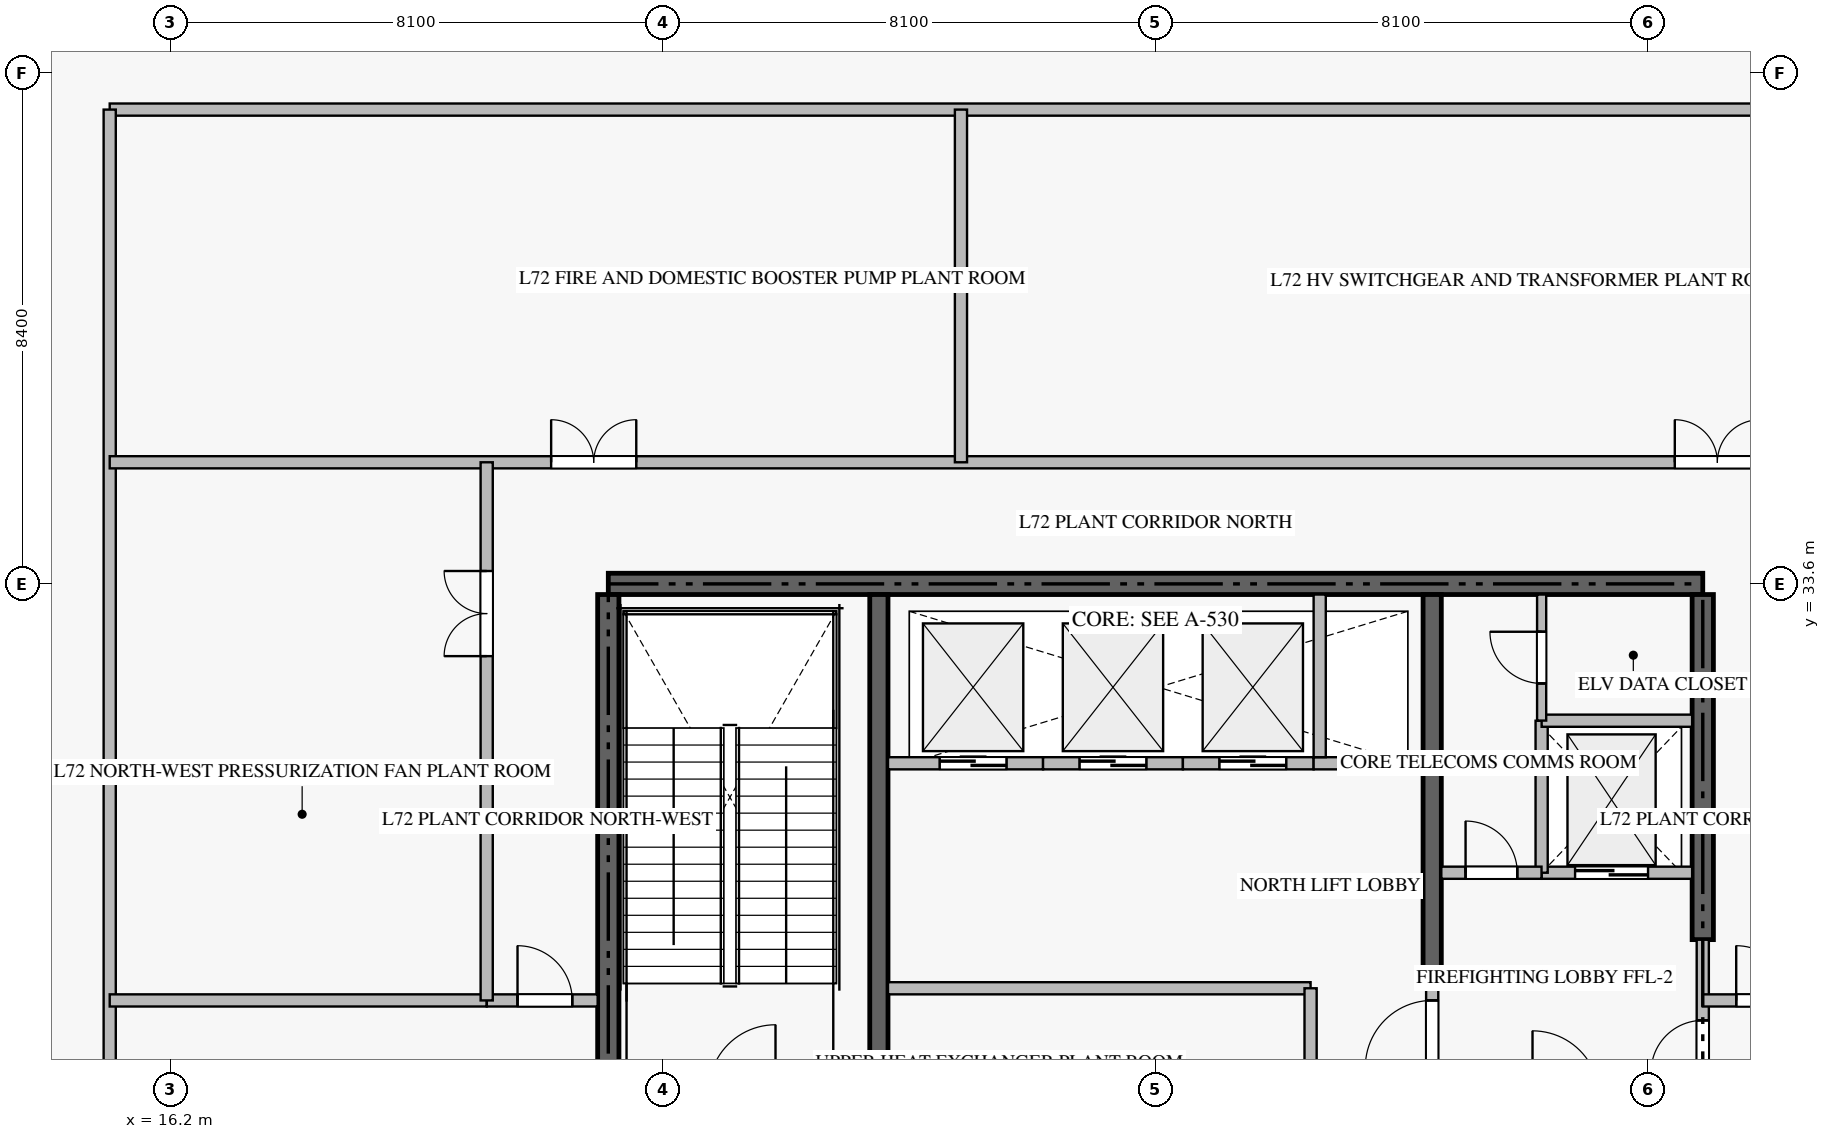
"""IFC4 building model, lengths in metres.
Left out: names, types, materials, properties, quantities, classifications, styles, units other than length and angle.
Written with IfcOpenShell. Run it as: python <this file> out.ifc"""

import sys

from ifc_helpers import new_model, si_unit, direction, frame, frame_2d, origin, place, context, subcontext, project, spatial, rectangle, extrude, source, transform, mapped, element, fill, save


model = new_model("IFC4")
c1 = context("Model", 3, precision=1e-05, world=origin(), true_north=direction((0.0, 1.0)))
c2 = subcontext(c1, "Body", "Model", "MODEL_VIEW")
j1 = project(units=[si_unit("LENGTHUNIT", "METRE"), si_unit("PLANEANGLEUNIT", "RADIAN")], contexts=[c1])
p1 = place(None, origin())
s1 = spatial("IfcSite", under=j1, at=p1, CompositionType="ELEMENT")
p2 = place(p1, origin())
s2 = spatial("IfcBuilding", under=s1, at=p2, CompositionType="ELEMENT")
p3 = place(p2, frame((0.0, 0.0, 287.45)))
s3 = spatial("IfcBuildingStorey", under=s2, at=p3, CompositionType="ELEMENT", Elevation=287.45)
p4 = place(p3, frame((41.4, 33.6, -0.44), z_axis=(0.0, 0.0, 1.0), x_axis=(-1.0, 0.0, 0.0)))
e1 = element("IfcWall", 1, at=p4, inside=s3, PredefinedType="SHEAR", context=c2, shape_type="SweptSolid", body=[
    extrude(rectangle(XDim=18.0, YDim=0.35, at=frame_2d((9.0, 0.0))), origin(), (0.0, 0.0, 1.0), 6.178),
])
p5 = place(p3, frame((23.4, 24.25, -0.44), z_axis=(0.0, 0.0, 1.0), x_axis=(0.0, 1.0, 0.0)))
e2 = element("IfcWall", 2, at=p5, inside=s3, PredefinedType="SHEAR", context=c2, shape_type="SweptSolid", body=[
    extrude(rectangle(XDim=9.175, YDim=0.35, at=frame_2d((4.587, 0.0))), origin(), (0.0, 0.0, 1.0), 6.178),
])
p6 = place(p3, frame((41.4, 27.75, -0.44), z_axis=(0.0, 0.0, 1.0), x_axis=(0.0, 1.0, 0.0)))
e3 = element("IfcWall", 3, at=p6, inside=s3, PredefinedType="SHEAR", context=c2, shape_type="SweptSolid", body=[
    extrude(rectangle(XDim=5.675, YDim=0.35, at=frame_2d((2.837, 0.0))), origin(), (0.0, 0.0, 1.0), 6.178),
])
p7 = place(p3, frame((27.85, 23.55, -0.44), z_axis=(0.0, 0.0, 1.0), x_axis=(0.0, 1.0, 0.0)))
e4 = element("IfcWall", 4, at=p7, inside=s3, PredefinedType="SHEAR", context=c2, shape_type="SweptSolid", body=[
    extrude(rectangle(XDim=9.875, YDim=0.3, at=frame_2d((4.938, 0.0))), origin(), (0.0, 0.0, 1.0), 6.178),
])
p8 = place(p3, frame((36.95, 27.05, -0.44), z_axis=(0.0, 0.0, 1.0), x_axis=(0.0, 1.0, 0.0)))
e5 = element("IfcWall", 5, at=p8, inside=s3, PredefinedType="SHEAR", context=c2, shape_type="SweptSolid", body=[
    extrude(rectangle(XDim=6.375, YDim=0.3, at=frame_2d((3.188, 0.0))), origin(), (0.0, 0.0, 1.0), 6.178),
])
p9 = place(p3, frame((38.75, 28.85, 0.0), z_axis=(0.0, 0.0, 1.0), x_axis=(1.0, 0.0, 0.0)))
e6 = element("IfcWall", 6, at=p9, inside=s3, PredefinedType="STANDARD", context=c2, shape_type="SweptSolid", body=[
    extrude(rectangle(XDim=2.475, YDim=0.2, at=frame_2d((1.238, 0.0))), origin(), (0.0, 0.0, 1.0), 5.74),
])
p10 = place(p9, frame((0.55, 0.0, 0.0)))
e7 = element("IfcOpeningElement", 7, at=p10, cuts=e6, PredefinedType="OPENING", context=c2, shape_type="SweptSolid", body=[
    extrude(rectangle(XDim=1.2, YDim=2.2, at=frame_2d((0.6, 1.1))), frame((0.0, 0.11, 0.0), z_axis=(0.0, -1.0, 0.0), x_axis=(1.0, 0.0, 0.0)), (0.0, 0.0, 1.0), 0.22),
])
p11 = place(p3, frame((28.0, 30.65, 0.0), z_axis=(0.0, 0.0, 1.0), x_axis=(1.0, 0.0, 0.0)))
e8 = element("IfcWall", 8, at=p11, inside=s3, PredefinedType="STANDARD", context=c2, shape_type="SweptSolid", body=[
    extrude(rectangle(XDim=2.55, YDim=0.2, at=frame_2d((1.275, 0.0))), origin(), (0.0, 0.0, 1.0), 5.74),
])
p12 = place(p11, frame((0.85, 0.0, 0.0)))
e9 = element("IfcOpeningElement", 9, at=p12, cuts=e8, PredefinedType="OPENING", context=c2, shape_type="SweptSolid", body=[
    extrude(rectangle(XDim=1.1, YDim=2.2, at=frame_2d((0.55, 1.1))), frame((0.0, 0.11, 0.0), z_axis=(0.0, -1.0, 0.0), x_axis=(1.0, 0.0, 0.0)), (0.0, 0.0, 1.0), 0.22),
])
p13 = place(p3, frame((30.55, 30.65, 0.0), z_axis=(0.0, 0.0, 1.0), x_axis=(1.0, 0.0, 0.0)))
e10 = element("IfcWall", 10, at=p13, inside=s3, PredefinedType="STANDARD", context=c2, shape_type="SweptSolid", body=[
    extrude(rectangle(XDim=2.3, YDim=0.2, at=frame_2d((1.15, 0.0))), origin(), (0.0, 0.0, 1.0), 5.74),
])
p14 = place(p13, frame((0.6, 0.0, 0.0)))
e11 = element("IfcOpeningElement", 11, at=p14, cuts=e10, PredefinedType="OPENING", context=c2, shape_type="SweptSolid", body=[
    extrude(rectangle(XDim=1.1, YDim=2.2, at=frame_2d((0.55, 1.1))), frame((0.0, 0.11, 0.0), z_axis=(0.0, -1.0, 0.0), x_axis=(1.0, 0.0, 0.0)), (0.0, 0.0, 1.0), 0.22),
])
p15 = place(p3, frame((32.85, 30.65, 0.0), z_axis=(0.0, 0.0, 1.0), x_axis=(1.0, 0.0, 0.0)))
e12 = element("IfcWall", 12, at=p15, inside=s3, PredefinedType="STANDARD", context=c2, shape_type="SweptSolid", body=[
    extrude(rectangle(XDim=2.15, YDim=0.2, at=frame_2d((1.075, 0.0))), origin(), (0.0, 0.0, 1.0), 5.74),
])
p16 = place(p15, frame((0.6, 0.0, 0.0)))
e13 = element("IfcOpeningElement", 13, at=p16, cuts=e12, PredefinedType="OPENING", context=c2, shape_type="SweptSolid", body=[
    extrude(rectangle(XDim=1.1, YDim=2.2, at=frame_2d((0.55, 1.1))), frame((0.0, 0.11, 0.0), z_axis=(0.0, -1.0, 0.0), x_axis=(1.0, 0.0, 0.0)), (0.0, 0.0, 1.0), 0.22),
])
p17 = place(p3, frame((35.0, 30.65, 0.0), z_axis=(0.0, 0.0, 1.0), x_axis=(1.0, 0.0, 0.0)))
e14 = element("IfcWall", 14, at=p17, inside=s3, PredefinedType="STANDARD", context=c2, shape_type="SweptSolid", body=[
    extrude(rectangle(XDim=1.8, YDim=0.2, at=frame_2d((0.9, 0.0))), origin(), (0.0, 0.0, 1.0), 5.74),
])
p18 = place(p3, frame((35.1, 30.75, 0.0), z_axis=(0.0, 0.0, 1.0), x_axis=(0.0, 1.0, 0.0)))
e15 = element("IfcWall", 15, at=p18, inside=s3, PredefinedType="STANDARD", context=c2, shape_type="SweptSolid", body=[
    extrude(rectangle(XDim=2.675, YDim=0.2, at=frame_2d((1.337, 0.0))), origin(), (0.0, 0.0, 1.0), 5.74),
])
p19 = place(p3, frame((38.75, 28.85, 0.0), z_axis=(0.0, 0.0, 1.0), x_axis=(0.0, 1.0, 0.0)))
e16 = element("IfcWall", 16, at=p19, inside=s3, PredefinedType="STANDARD", context=c2, shape_type="SweptSolid", body=[
    extrude(rectangle(XDim=2.5, YDim=0.2, at=frame_2d((1.25, 0.0))), origin(), (0.0, 0.0, 1.0), 5.74),
])
p20 = place(p3, frame((38.75, 31.35, 0.0), z_axis=(0.0, 0.0, 1.0), x_axis=(1.0, 0.0, 0.0)))
e17 = element("IfcWall", 17, at=p20, inside=s3, PredefinedType="STANDARD", context=c2, shape_type="SweptSolid", body=[
    extrude(rectangle(XDim=2.475, YDim=0.2, at=frame_2d((1.238, 0.0))), origin(), (0.0, 0.0, 1.0), 5.74),
])
p21 = place(p3, frame((37.1, 28.85, 0.0), z_axis=(0.0, 0.0, 1.0), x_axis=(1.0, 0.0, 0.0)))
e18 = element("IfcWall", 18, at=p21, inside=s3, PredefinedType="STANDARD", context=c2, shape_type="SweptSolid", body=[
    extrude(rectangle(XDim=1.648, YDim=0.2, at=frame_2d((0.824, 0.0))), origin(), (0.0, 0.0, 1.0), 5.74),
])
p22 = place(p21, frame((0.399, 0.0, 0.0)))
e19 = element("IfcOpeningElement", 19, at=p22, cuts=e18, PredefinedType="OPENING", context=c2, shape_type="SweptSolid", body=[
    extrude(rectangle(XDim=0.85, YDim=2.1, at=frame_2d((0.425, 1.05))), frame((0.0, 0.11, 0.0), z_axis=(0.0, -1.0, 0.0), x_axis=(1.0, 0.0, 0.0)), (0.0, 0.0, 1.0), 0.22),
])
p23 = place(p3, frame((41.4, 25.352, 0.0), z_axis=(0.0, 0.0, 1.0), x_axis=(0.0, 1.0, 0.0)))
e20 = element("IfcWall", 20, at=p23, inside=s3, PredefinedType="STANDARD", context=c2, shape_type="SweptSolid", body=[
    extrude(rectangle(XDim=2.396, YDim=0.2, at=frame_2d((1.198, 0.0))), origin(), (0.0, 0.0, 1.0), 5.74),
])
p24 = place(p23, frame((0.22, 0.0, 0.0)))
e21 = element("IfcOpeningElement", 21, at=p24, cuts=e20, PredefinedType="OPENING", context=c2, shape_type="SweptSolid", body=[
    extrude(rectangle(XDim=0.85, YDim=2.1, at=frame_2d((0.425, 1.05))), frame((0.0, 0.11, 0.0), z_axis=(0.0, -1.0, 0.0), x_axis=(1.0, 0.0, 0.0)), (0.0, 0.0, 1.0), 0.22),
])
p25 = place(p3, frame((36.95, 25.352, 0.0), z_axis=(0.0, 0.0, 1.0), x_axis=(0.0, 1.0, 0.0)))
e22 = element("IfcWall", 22, at=p25, inside=s3, PredefinedType="STANDARD", context=c2, shape_type="SweptSolid", body=[
    extrude(rectangle(XDim=1.696, YDim=0.2, at=frame_2d((0.848, 0.0))), origin(), (0.0, 0.0, 1.0), 5.74),
])
p26 = place(p25, frame((0.298, 0.0, 0.0)))
e23 = element("IfcOpeningElement", 23, at=p26, cuts=e22, PredefinedType="OPENING", context=c2, shape_type="SweptSolid", body=[
    extrude(rectangle(XDim=1.1, YDim=2.15, at=frame_2d((0.55, 1.075))), frame((0.0, 0.11, 0.0), z_axis=(0.0, -1.0, 0.0), x_axis=(1.0, 0.0, 0.0)), (0.0, 0.0, 1.0), 0.22),
])
p27 = place(p3, frame((38.75, 31.352, 0.0), z_axis=(0.0, 0.0, 1.0), x_axis=(0.0, 1.0, 0.0)))
e24 = element("IfcWall", 24, at=p27, inside=s3, PredefinedType="PARTITIONING", context=c2, shape_type="SweptSolid", body=[
    extrude(rectangle(XDim=2.073, YDim=0.15, at=frame_2d((1.037, 0.0))), origin(), (0.0, 0.0, 1.0), 5.74),
])
p28 = place(p27, frame((0.611, 0.0, 0.0)))
e25 = element("IfcOpeningElement", 25, at=p28, cuts=e24, PredefinedType="OPENING", context=c2, shape_type="SweptSolid", body=[
    extrude(rectangle(XDim=0.85, YDim=2.1, at=frame_2d((0.425, 1.05))), frame((0.0, 0.085, 0.0), z_axis=(0.0, -1.0, 0.0), x_axis=(1.0, 0.0, 0.0)), (0.0, 0.0, 1.0), 0.17),
])
p29 = place(p3, frame((28.0, 26.95, 0.0), z_axis=(0.0, 0.0, 1.0), x_axis=(1.0, 0.0, 0.0)))
e26 = element("IfcWall", 26, at=p29, inside=s3, PredefinedType="STANDARD", context=c2, shape_type="SweptSolid", body=[
    extrude(rectangle(XDim=6.95, YDim=0.2, at=frame_2d((3.475, 0.0))), origin(), (0.0, 0.0, 1.0), 5.74),
])
p30 = place(p3, frame((34.95, 24.15, 0.0), z_axis=(0.0, 0.0, 1.0), x_axis=(0.0, 1.0, 0.0)))
e27 = element("IfcWall", 27, at=p30, inside=s3, PredefinedType="STANDARD", context=c2, shape_type="SweptSolid", body=[
    extrude(rectangle(XDim=2.8, YDim=0.2, at=frame_2d((1.4, 0.0))), origin(), (0.0, 0.0, 1.0), 5.74),
])
p31 = place(p3, frame((15.2, 41.4, 0.0), z_axis=(0.0, 0.0, 1.0), x_axis=(1.0, 0.0, 0.0)))
e28 = element("IfcWall", 28, at=p31, inside=s3, PredefinedType="STANDARD", context=c2, shape_type="SweptSolid", body=[
    extrude(rectangle(XDim=34.4, YDim=0.2, at=frame_2d((17.2, 0.0))), origin(), (0.0, 0.0, 1.0), 5.74),
])
p32 = place(p3, frame((15.2, 9.0, 0.0), z_axis=(0.0, 0.0, 1.0), x_axis=(0.0, 1.0, 0.0)))
e29 = element("IfcWall", 29, at=p32, inside=s3, PredefinedType="STANDARD", context=c2, shape_type="SweptSolid", body=[
    extrude(rectangle(XDim=32.4, YDim=0.2, at=frame_2d((16.2, 0.0))), origin(), (0.0, 0.0, 1.0), 5.74),
])
p33 = place(p3, frame((15.2, 26.75, 0.0), z_axis=(0.0, 0.0, 1.0), x_axis=(1.0, 0.0, 0.0)))
e30 = element("IfcWall", 30, at=p33, inside=s3, PredefinedType="STANDARD", context=c2, shape_type="SweptSolid", body=[
    extrude(rectangle(XDim=6.2, YDim=0.2, at=frame_2d((3.1, 0.0))), origin(), (0.0, 0.0, 1.0), 5.74),
])
p34 = place(p3, frame((21.402, 26.75, 0.0), z_axis=(0.0, 0.0, 1.0), x_axis=(1.0, 0.0, 0.0)))
e31 = element("IfcWall", 31, at=p34, inside=s3, PredefinedType="STANDARD", context=c2, shape_type="SweptSolid", body=[
    extrude(rectangle(XDim=1.823, YDim=0.2, at=frame_2d((0.912, 0.0))), origin(), (0.0, 0.0, 1.0), 5.74),
])
p35 = place(p34, frame((0.505, 0.0, 0.0)))
e32 = element("IfcOpeningElement", 32, at=p35, cuts=e31, PredefinedType="OPENING", context=c2, shape_type="SweptSolid", body=[
    extrude(rectangle(XDim=0.9, YDim=2.1, at=frame_2d((0.45, 1.05))), frame((0.0, 0.11, 0.0), z_axis=(0.0, -1.0, 0.0), x_axis=(1.0, 0.0, 0.0)), (0.0, 0.0, 1.0), 0.22),
])
p36 = place(p3, frame((41.4, 26.75, 0.0), z_axis=(0.0, 0.0, 1.0), x_axis=(1.0, 0.0, 0.0)))
e33 = element("IfcWall", 33, at=p36, inside=s3, PredefinedType="STANDARD", context=c2, shape_type="SweptSolid", body=[
    extrude(rectangle(XDim=2.0, YDim=0.2, at=frame_2d((1.0, 0.0))), origin(), (0.0, 0.0, 1.0), 5.74),
])
p37 = place(p36, frame((0.55, 0.0, 0.0)))
e34 = element("IfcOpeningElement", 34, at=p37, cuts=e33, PredefinedType="OPENING", context=c2, shape_type="SweptSolid", body=[
    extrude(rectangle(XDim=0.9, YDim=2.1, at=frame_2d((0.45, 1.05))), frame((0.0, 0.11, 0.0), z_axis=(0.0, -1.0, 0.0), x_axis=(1.0, 0.0, 0.0)), (0.0, 0.0, 1.0), 0.22),
])
p38 = place(p3, frame((15.2, 35.6, 0.0), z_axis=(0.0, 0.0, 1.0), x_axis=(1.0, 0.0, 0.0)))
e35 = element("IfcWall", 35, at=p38, inside=s3, PredefinedType="STANDARD", context=c2, shape_type="SweptSolid", body=[
    extrude(rectangle(XDim=34.4, YDim=0.2, at=frame_2d((17.2, 0.0))), origin(), (0.0, 0.0, 1.0), 5.74),
])
p39 = place(p38, frame((7.26, 0.0, 0.0)))
e36 = element("IfcOpeningElement", 36, at=p39, cuts=e35, PredefinedType="OPENING", context=c2, shape_type="SweptSolid", body=[
    extrude(rectangle(XDim=1.4, YDim=2.2, at=frame_2d((0.7, 1.1))), frame((0.0, 0.11, 0.0), z_axis=(0.0, -1.0, 0.0), x_axis=(1.0, 0.0, 0.0)), (0.0, 0.0, 1.0), 0.22),
])
p40 = place(p38, frame((25.74, 0.0, 0.0)))
e37 = element("IfcOpeningElement", 37, at=p40, cuts=e35, PredefinedType="OPENING", context=c2, shape_type="SweptSolid", body=[
    extrude(rectangle(XDim=1.4, YDim=2.2, at=frame_2d((0.7, 1.1))), frame((0.0, 0.11, 0.0), z_axis=(0.0, -1.0, 0.0), x_axis=(1.0, 0.0, 0.0)), (0.0, 0.0, 1.0), 0.22),
])
p41 = place(p3, frame((29.2, 35.6, 0.0), z_axis=(0.0, 0.0, 1.0), x_axis=(0.0, 1.0, 0.0)))
e38 = element("IfcWall", 38, at=p41, inside=s3, PredefinedType="STANDARD", context=c2, shape_type="SweptSolid", body=[
    extrude(rectangle(XDim=5.8, YDim=0.2, at=frame_2d((2.9, 0.0))), origin(), (0.0, 0.0, 1.0), 5.74),
])
p42 = place(p3, frame((21.4, 26.75, 0.0), z_axis=(0.0, 0.0, 1.0), x_axis=(0.0, 1.0, 0.0)))
e39 = element("IfcWall", 39, at=p42, inside=s3, PredefinedType="STANDARD", context=c2, shape_type="SweptSolid", body=[
    extrude(rectangle(XDim=8.85, YDim=0.2, at=frame_2d((4.425, 0.0))), origin(), (0.0, 0.0, 1.0), 5.74),
])
p43 = place(p42, frame((5.662, 0.0, 0.0)))
e40 = element("IfcOpeningElement", 40, at=p43, cuts=e39, PredefinedType="OPENING", context=c2, shape_type="SweptSolid", body=[
    extrude(rectangle(XDim=1.4, YDim=2.2, at=frame_2d((0.7, 1.1))), frame((0.0, 0.11, 0.0), z_axis=(0.0, -1.0, 0.0), x_axis=(1.0, 0.0, 0.0)), (0.0, 0.0, 1.0), 0.22),
])
m1 = source(origin(), c2, "Body", "SweptSolid", [
    extrude(rectangle(XDim=1.2, YDim=2.2, at=frame_2d((0.6, 1.1))), frame((0.0, 0.025, 0.0), z_axis=(0.0, -1.0, 0.0), x_axis=(1.0, 0.0, 0.0)), (0.0, 0.0, 1.0), 0.05),
])
p44 = place(p10, origin())
e41 = element("IfcDoor", 41, at=p44, inside=s3, OperationType="DOUBLE_DOOR_SLIDING", PredefinedType="DOOR", context=c2, shape_type="MappedRepresentation", body=[
    mapped(m1, transform((0.0, 0.0, 0.0), scale=1.0)),
])
fill(e7, e41)
m2 = source(origin(), c2, "Body", "SweptSolid", [
    extrude(rectangle(XDim=1.1, YDim=2.2, at=frame_2d((0.55, 1.1))), frame((0.0, 0.025, 0.0), z_axis=(0.0, -1.0, 0.0), x_axis=(1.0, 0.0, 0.0)), (0.0, 0.0, 1.0), 0.05),
])
p45 = place(p12, origin())
e42 = element("IfcDoor", 42, at=p45, inside=s3, OperationType="DOUBLE_DOOR_SLIDING", PredefinedType="DOOR", context=c2, shape_type="MappedRepresentation", body=[
    mapped(m2, transform((0.0, 0.0, 0.0), scale=1.0)),
])
fill(e9, e42)
p46 = place(p14, origin())
e43 = element("IfcDoor", 43, at=p46, inside=s3, OperationType="DOUBLE_DOOR_SLIDING", PredefinedType="DOOR", context=c2, shape_type="MappedRepresentation", body=[
    mapped(m2, transform((0.0, 0.0, 0.0), scale=1.0)),
])
fill(e11, e43)
p47 = place(p16, origin())
e44 = element("IfcDoor", 44, at=p47, inside=s3, OperationType="DOUBLE_DOOR_SLIDING", PredefinedType="DOOR", context=c2, shape_type="MappedRepresentation", body=[
    mapped(m2, transform((0.0, 0.0, 0.0), scale=1.0)),
])
fill(e13, e44)
m3 = source(origin(), c2, "Body", "SweptSolid", [
    extrude(rectangle(XDim=0.85, YDim=2.1, at=frame_2d((0.425, 1.05))), frame((0.0, 0.025, 0.0), z_axis=(0.0, -1.0, 0.0), x_axis=(1.0, 0.0, 0.0)), (0.0, 0.0, 1.0), 0.05),
])
p48 = place(p22, origin())
e45 = element("IfcDoor", 45, at=p48, inside=s3, OperationType="SINGLE_SWING_LEFT", PredefinedType="DOOR", context=c2, shape_type="MappedRepresentation", body=[
    mapped(m3, transform((0.0, 0.0, 0.0), scale=1.0)),
])
fill(e19, e45)
p49 = place(p24, origin())
e46 = element("IfcDoor", 46, at=p49, inside=s3, OperationType="SINGLE_SWING_LEFT", PredefinedType="DOOR", context=c2, shape_type="MappedRepresentation", body=[
    mapped(m3, transform((0.0, 0.0, 0.0), scale=1.0)),
])
fill(e21, e46)
m4 = source(origin(), c2, "Body", "SweptSolid", [
    extrude(rectangle(XDim=1.1, YDim=2.15, at=frame_2d((0.55, 1.075))), frame((0.0, 0.025, 0.0), z_axis=(0.0, -1.0, 0.0), x_axis=(1.0, 0.0, 0.0)), (0.0, 0.0, 1.0), 0.05),
])
p50 = place(p26, origin())
e47 = element("IfcDoor", 47, at=p50, inside=s3, OperationType="SINGLE_SWING_LEFT", PredefinedType="DOOR", context=c2, shape_type="MappedRepresentation", body=[
    mapped(m4, transform((0.0, 0.0, 0.0), scale=1.0)),
])
fill(e23, e47)
p51 = place(p28, origin())
e48 = element("IfcDoor", 48, at=p51, inside=s3, OperationType="SINGLE_SWING_RIGHT", PredefinedType="DOOR", context=c2, shape_type="MappedRepresentation", body=[
    mapped(m3, transform((0.0, 0.0, 0.0), scale=1.0)),
])
fill(e25, e48)
m5 = source(origin(), c2, "Body", "SweptSolid", [
    extrude(rectangle(XDim=0.9, YDim=2.1, at=frame_2d((0.45, 1.05))), frame((0.0, 0.025, 0.0), z_axis=(0.0, -1.0, 0.0), x_axis=(1.0, 0.0, 0.0)), (0.0, 0.0, 1.0), 0.05),
])
p52 = place(p35, origin())
e49 = element("IfcDoor", 49, at=p52, inside=s3, OperationType="SINGLE_SWING_LEFT", PredefinedType="DOOR", context=c2, shape_type="MappedRepresentation", body=[
    mapped(m5, transform((0.0, 0.0, 0.0), scale=1.0)),
])
fill(e32, e49)
p53 = place(p37, origin())
e50 = element("IfcDoor", 50, at=p53, inside=s3, OperationType="SINGLE_SWING_LEFT", PredefinedType="DOOR", context=c2, shape_type="MappedRepresentation", body=[
    mapped(m5, transform((0.0, 0.0, 0.0), scale=1.0)),
])
fill(e34, e50)
m6 = source(origin(), c2, "Body", "SweptSolid", [
    extrude(rectangle(XDim=1.4, YDim=2.2, at=frame_2d((0.7, 1.1))), frame((0.0, 0.025, 0.0), z_axis=(0.0, -1.0, 0.0), x_axis=(1.0, 0.0, 0.0)), (0.0, 0.0, 1.0), 0.05),
])
p54 = place(p39, origin())
e51 = element("IfcDoor", 51, at=p54, inside=s3, OperationType="DOUBLE_DOOR_SINGLE_SWING", PredefinedType="DOOR", context=c2, shape_type="MappedRepresentation", body=[
    mapped(m6, transform((0.0, 0.0, 0.0), scale=1.0)),
])
fill(e36, e51)
p55 = place(p40, origin())
e52 = element("IfcDoor", 52, at=p55, inside=s3, OperationType="DOUBLE_DOOR_SINGLE_SWING", PredefinedType="DOOR", context=c2, shape_type="MappedRepresentation", body=[
    mapped(m6, transform((0.0, 0.0, 0.0), scale=1.0)),
])
fill(e37, e52)
p56 = place(p43, origin())
e53 = element("IfcDoor", 53, at=p56, inside=s3, OperationType="DOUBLE_DOOR_SINGLE_SWING", PredefinedType="DOOR", context=c2, shape_type="MappedRepresentation", body=[
    mapped(m6, transform((0.0, 0.0, 0.0), scale=1.0)),
])
fill(e40, e53)
save(model, sys.argv[1])
